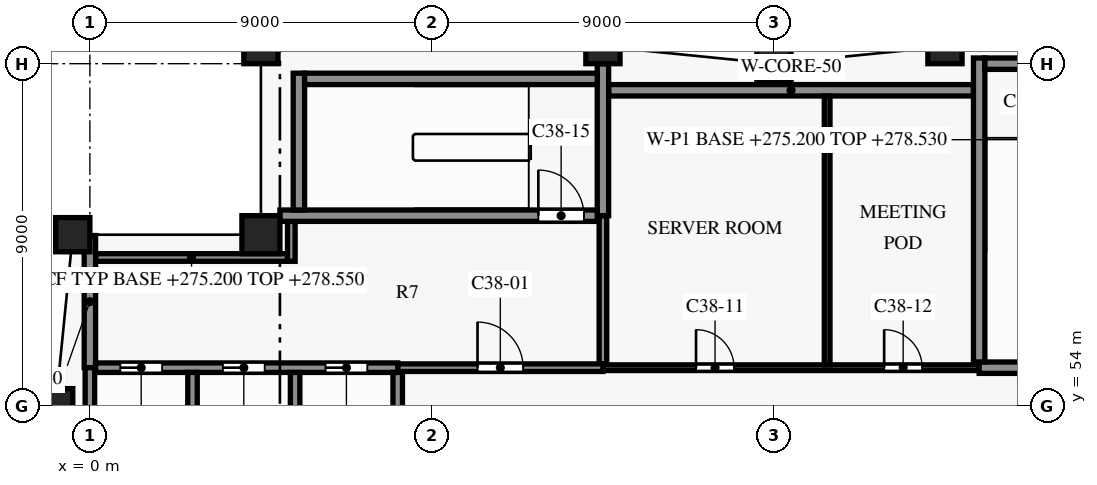
"""IFC4 building model, lengths in metres.
Left out: names, types, materials, properties, quantities, classifications, styles, units other than length and angle.
Written with IfcOpenShell. Run it as: python <this file> out.ifc"""

import sys

from ifc_helpers import new_model, si_unit, direction, frame, frame_2d, origin, origin_2d, place, context, subcontext, project, spatial, rectangle, extrude, element, fill, save


model = new_model("IFC4")
c1 = context("Model", 3, precision=1e-05, world=origin(), true_north=direction((0.0, 1.0)))
c2 = subcontext(c1, "Body", "Model", "MODEL_VIEW")
j1 = project(units=[si_unit("LENGTHUNIT", "METRE"), si_unit("PLANEANGLEUNIT", "RADIAN")], contexts=[c1])
p1 = place(None, origin())
s1 = spatial("IfcSite", under=j1, at=p1, CompositionType="ELEMENT")
p2 = place(p1, origin())
s2 = spatial("IfcBuilding", under=s1, at=p2, CompositionType="ELEMENT")
p3 = place(p2, frame((0.0, 0.0, 275.2)))
s3 = spatial("IfcBuildingStorey", under=s2, at=p3, CompositionType="ELEMENT", Elevation=275.2)
for number, where, z_axis, x_axis in (
    (1, (22.5, 63.45, 0.0), (0.0, 0.0, 1.0), (-0.995, -0.1, 0.0)),
    (2, (18.0, 63.0, 0.0), (0.0, 0.0, 1.0), (-1.0, 0.0, 0.0)),
    (3, (13.5, 63.45, 0.0), (0.0, 0.0, 1.0), (-0.995, 0.1, 0.0)),
    (4, (4.5, 63.45, 0.0), (0.0, 0.0, 1.0), (-0.995, -0.1, 0.0)),
    (5, (-0.45, 58.5, 0.0), (0.0, 0.0, 1.0), (-0.1, -0.995, 0.0)),
    (6, (-0.9, 54.0, 0.0), (0.0, 0.0, 1.0), (0.0, -1.0, 0.0)),
):
    element("IfcColumn", number, at=place(p3, frame(where, z_axis=z_axis, x_axis=x_axis)), inside=s3, PredefinedType="COLUMN", context=c2, shape_type="SweptSolid", body=[
        extrude(rectangle(XDim=0.9, YDim=0.9, at=origin_2d()), origin(), (0.0, 0.0, 1.0), 3.8),
    ])
p4 = place(p3, frame((4.5, 58.5, 0.0), z_axis=(0.0, 0.0, 1.0), x_axis=(1.0, 0.0, 0.0)))
e7 = element("IfcColumn", 7, at=p4, inside=s3, PredefinedType="COLUMN", context=c2, shape_type="SweptSolid", body=[
    extrude(rectangle(XDim=1.0, YDim=1.0, at=origin_2d()), origin(), (0.0, 0.0, 1.0), 3.8),
])
p5 = place(p3, frame((8.1, 55.0, 0.0), z_axis=(0.0, 0.0, 1.0), x_axis=(1.0, 0.0, 0.0)))
e8 = element("IfcWall", 8, at=p5, inside=s3, PredefinedType="PARTITIONING", context=c2, shape_type="SweptSolid", body=[
    extrude(rectangle(XDim=5.4, YDim=0.2, at=frame_2d((2.7, 0.0))), origin(), (0.0, 0.0, 1.0), 3.35),
])
p6 = place(p5, frame((2.1, 0.0, 0.0)))
e9 = element("IfcOpeningElement", 9, at=p6, cuts=e8, PredefinedType="OPENING", context=c2, shape_type="SweptSolid", body=[
    extrude(rectangle(XDim=1.2, YDim=2.2, at=frame_2d((0.6, 1.1))), frame((0.0, 0.11, 0.0), z_axis=(0.0, -1.0, 0.0), x_axis=(1.0, 0.0, 0.0)), (0.0, 0.0, 1.0), 0.22),
])
p7 = place(p3, frame((13.5, 55.0, 0.0), z_axis=(0.0, 0.0, 1.0), x_axis=(1.0, 0.0, 0.0)))
e10 = element("IfcWall", 10, at=p7, inside=s3, PredefinedType="PARTITIONING", context=c2, shape_type="SweptSolid", body=[
    extrude(rectangle(XDim=9.9, YDim=0.15, at=frame_2d((4.95, 0.0))), origin(), (0.0, 0.0, 1.0), 3.35),
])
p8 = place(p7, frame((2.45, 0.0, 0.0)))
e11 = element("IfcOpeningElement", 11, at=p8, cuts=e10, PredefinedType="OPENING", context=c2, shape_type="SweptSolid", body=[
    extrude(rectangle(XDim=1.0, YDim=2.1, at=frame_2d((0.5, 1.05))), frame((0.0, 0.085, 0.0), z_axis=(0.0, -1.0, 0.0), x_axis=(1.0, 0.0, 0.0)), (0.0, 0.0, 1.0), 0.17),
])
p9 = place(p7, frame((7.4, 0.0, 0.0)))
e12 = element("IfcOpeningElement", 12, at=p9, cuts=e10, PredefinedType="OPENING", context=c2, shape_type="SweptSolid", body=[
    extrude(rectangle(XDim=1.0, YDim=2.1, at=frame_2d((0.5, 1.05))), frame((0.0, 0.085, 0.0), z_axis=(0.0, -1.0, 0.0), x_axis=(1.0, 0.0, 0.0)), (0.0, 0.0, 1.0), 0.17),
])
p10 = place(p3, frame((0.15, 55.0, 0.0), z_axis=(0.0, 0.0, 1.0), x_axis=(1.0, 0.0, 0.0)))
e13 = element("IfcWall", 13, at=p10, inside=s3, PredefinedType="SHEAR", context=c2, shape_type="SweptSolid", body=[
    extrude(rectangle(XDim=7.95, YDim=0.25, at=frame_2d((3.975, 0.0))), origin(), (0.0, 0.0, 1.0), 3.5),
])
p11 = place(p10, frame((0.65, 0.0, 0.0)))
e14 = element("IfcOpeningElement", 14, at=p11, cuts=e13, PredefinedType="OPENING", context=c2, shape_type="SweptSolid", body=[
    extrude(rectangle(XDim=1.1, YDim=2.1, at=frame_2d((0.55, 1.05))), frame((0.0, 0.135, 0.0), z_axis=(0.0, -1.0, 0.0), x_axis=(1.0, 0.0, 0.0)), (0.0, 0.0, 1.0), 0.27),
])
p12 = place(p10, frame((3.35, 0.0, 0.0)))
e15 = element("IfcOpeningElement", 15, at=p12, cuts=e13, PredefinedType="OPENING", context=c2, shape_type="SweptSolid", body=[
    extrude(rectangle(XDim=1.1, YDim=2.1, at=frame_2d((0.55, 1.05))), frame((0.0, 0.135, 0.0), z_axis=(0.0, -1.0, 0.0), x_axis=(1.0, 0.0, 0.0)), (0.0, 0.0, 1.0), 0.27),
])
p13 = place(p10, frame((6.05, 0.0, 0.0)))
e16 = element("IfcOpeningElement", 16, at=p13, cuts=e13, PredefinedType="OPENING", context=c2, shape_type="SweptSolid", body=[
    extrude(rectangle(XDim=1.1, YDim=2.1, at=frame_2d((0.55, 1.05))), frame((0.0, 0.135, 0.0), z_axis=(0.0, -1.0, 0.0), x_axis=(1.0, 0.0, 0.0)), (0.0, 0.0, 1.0), 0.27),
])
p14 = place(p3, frame((23.4, 55.0, 0.0), z_axis=(0.0, 0.0, 1.0), x_axis=(1.0, 0.0, 0.0)))
e17 = element("IfcWall", 17, at=p14, inside=s3, PredefinedType="SHEAR", context=c2, shape_type="SweptSolid", body=[
    extrude(rectangle(XDim=3.45, YDim=0.3, at=frame_2d((1.725, 0.0))), origin(), (0.0, 0.0, 1.0), 3.5),
])
p15 = place(p3, frame((0.15, 57.9, 0.0), z_axis=(0.0, 0.0, 1.0), x_axis=(1.0, 0.0, 0.0)))
e18 = element("IfcWall", 18, at=p15, inside=s3, PredefinedType="PARTITIONING", context=c2, shape_type="SweptSolid", body=[
    extrude(rectangle(XDim=5.05, YDim=0.2, at=frame_2d((2.525, 0.0))), origin(), (0.0, 0.0, 1.0), 3.35),
])
p16 = place(p3, frame((5.0, 59.0, 0.0), z_axis=(0.0, 0.0, 1.0), x_axis=(1.0, 0.0, 0.0)))
e19 = element("IfcWall", 19, at=p16, inside=s3, PredefinedType="SHEAR", context=c2, shape_type="SweptSolid", body=[
    extrude(rectangle(XDim=8.35, YDim=0.3, at=frame_2d((4.175, 0.0))), origin(), (0.0, 0.0, 1.0), 3.5),
])
p17 = place(p16, frame((6.8, 0.0, 0.0)))
e20 = element("IfcOpeningElement", 20, at=p17, cuts=e19, PredefinedType="OPENING", context=c2, shape_type="SweptSolid", body=[
    extrude(rectangle(XDim=1.2, YDim=2.2, at=frame_2d((0.6, 1.1))), frame((0.0, 0.16, 0.0), z_axis=(0.0, -1.0, 0.0), x_axis=(1.0, 0.0, 0.0)), (0.0, 0.0, 1.0), 0.32),
])
p18 = place(p3, frame((13.65, 62.3, 0.0), z_axis=(0.0, 0.0, 1.0), x_axis=(1.0, 0.0, 0.0)))
e21 = element("IfcWall", 21, at=p18, inside=s3, PredefinedType="SHEAR", context=c2, shape_type="SweptSolid", body=[
    extrude(rectangle(XDim=9.6, YDim=0.3, at=frame_2d((4.8, 0.0))), origin(), (0.0, 0.0, 1.0), 3.5),
])
p19 = place(p3, frame((5.65, 62.6, 0.0), z_axis=(0.0, 0.0, 1.0), x_axis=(1.0, 0.0, 0.0)))
e22 = element("IfcWall", 22, at=p19, inside=s3, PredefinedType="SHEAR", context=c2, shape_type="SweptSolid", body=[
    extrude(rectangle(XDim=7.7, YDim=0.3, at=frame_2d((3.85, 0.0))), origin(), (0.0, 0.0, 1.0), 3.5),
])
p20 = place(p3, frame((23.55, 63.0, 0.0), z_axis=(0.0, 0.0, 1.0), x_axis=(1.0, 0.0, 0.0)))
e23 = element("IfcWall", 23, at=p20, inside=s3, PredefinedType="SHEAR", context=c2, shape_type="SweptSolid", body=[
    extrude(rectangle(XDim=3.3, YDim=0.3, at=frame_2d((1.65, 0.0))), origin(), (0.0, 0.0, 1.0), 3.5),
])
p21 = place(p3, frame((0.0, 55.0, 0.0), z_axis=(0.0, 0.0, 1.0), x_axis=(0.0, 1.0, 0.0)))
e24 = element("IfcWall", 24, at=p21, inside=s3, PredefinedType="SHEAR", context=c2, shape_type="SweptSolid", body=[
    extrude(rectangle(XDim=3.478, YDim=0.3, at=frame_2d((1.739, 0.0))), origin(), (0.0, 0.0, 1.0), 3.5),
])
p22 = place(p3, frame((0.0, 51.65, 0.0), z_axis=(0.0, 0.0, 1.0), x_axis=(0.0, 1.0, 0.0)))
e25 = element("IfcWall", 25, at=p22, inside=s3, PredefinedType="SHEAR", context=c2, shape_type="SweptSolid", body=[
    extrude(rectangle(XDim=3.35, YDim=0.25, at=frame_2d((1.675, 0.0))), origin(), (0.0, 0.0, 1.0), 3.5),
])
p23 = place(p3, frame((2.7, 51.925, 0.0), z_axis=(0.0, 0.0, 1.0), x_axis=(0.0, 1.0, 0.0)))
e26 = element("IfcWall", 26, at=p23, inside=s3, PredefinedType="SHEAR", context=c2, shape_type="SweptSolid", body=[
    extrude(rectangle(XDim=2.95, YDim=0.25, at=frame_2d((1.475, 0.0))), origin(), (0.0, 0.0, 1.0), 3.5),
])
p24 = place(p3, frame((5.3, 57.8, 0.0), z_axis=(0.0, 0.0, 1.0), x_axis=(0.0, 1.0, 0.0)))
e27 = element("IfcWall", 27, at=p24, inside=s3, PredefinedType="PARTITIONING", context=c2, shape_type="SweptSolid", body=[
    extrude(rectangle(XDim=1.05, YDim=0.2, at=frame_2d((0.525, 0.0))), origin(), (0.0, 0.0, 1.0), 3.35),
])
p25 = place(p3, frame((5.4, 51.925, 0.0), z_axis=(0.0, 0.0, 1.0), x_axis=(0.0, 1.0, 0.0)))
e28 = element("IfcWall", 28, at=p25, inside=s3, PredefinedType="SHEAR", context=c2, shape_type="SweptSolid", body=[
    extrude(rectangle(XDim=2.95, YDim=0.25, at=frame_2d((1.475, 0.0))), origin(), (0.0, 0.0, 1.0), 3.5),
])
p26 = place(p3, frame((5.5, 59.15, 0.0), z_axis=(0.0, 0.0, 1.0), x_axis=(0.0, 1.0, 0.0)))
e29 = element("IfcWall", 29, at=p26, inside=s3, PredefinedType="SHEAR", context=c2, shape_type="SweptSolid", body=[
    extrude(rectangle(XDim=3.6, YDim=0.3, at=frame_2d((1.8, 0.0))), origin(), (0.0, 0.0, 1.0), 3.5),
])
p27 = place(p3, frame((8.1, 51.925, 0.0), z_axis=(0.0, 0.0, 1.0), x_axis=(0.0, 1.0, 0.0)))
e30 = element("IfcWall", 30, at=p27, inside=s3, PredefinedType="SHEAR", context=c2, shape_type="SweptSolid", body=[
    extrude(rectangle(XDim=2.95, YDim=0.25, at=frame_2d((1.475, 0.0))), origin(), (0.0, 0.0, 1.0), 3.5),
])
p28 = place(p3, frame((13.5, 55.1, 0.0), z_axis=(0.0, 0.0, 1.0), x_axis=(0.0, 1.0, 0.0)))
e31 = element("IfcWall", 31, at=p28, inside=s3, PredefinedType="PARTITIONING", context=c2, shape_type="SweptSolid", body=[
    extrude(rectangle(XDim=3.9, YDim=0.2, at=frame_2d((1.95, 0.0))), origin(), (0.0, 0.0, 1.0), 3.35),
])
p29 = place(p3, frame((13.5, 59.0, 0.0), z_axis=(0.0, 0.0, 1.0), x_axis=(0.0, 1.0, 0.0)))
e32 = element("IfcWall", 32, at=p29, inside=s3, PredefinedType="SHEAR", context=c2, shape_type="SweptSolid", body=[
    extrude(rectangle(XDim=3.998, YDim=0.3, at=frame_2d((1.999, 0.0))), origin(), (0.0, 0.0, 1.0), 3.5),
])
p30 = place(p3, frame((19.4, 55.075, 0.0), z_axis=(0.0, 0.0, 1.0), x_axis=(0.0, 1.0, 0.0)))
e33 = element("IfcWall", 33, at=p30, inside=s3, PredefinedType="PARTITIONING", context=c2, shape_type="SweptSolid", body=[
    extrude(rectangle(XDim=7.075, YDim=0.15, at=frame_2d((3.538, 0.0))), origin(), (0.0, 0.0, 1.0), 3.35),
])
p31 = place(p3, frame((23.4, 55.15, 0.0), z_axis=(0.0, 0.0, 1.0), x_axis=(0.0, 1.0, 0.0)))
e34 = element("IfcWall", 34, at=p31, inside=s3, PredefinedType="SHEAR", context=c2, shape_type="SweptSolid", body=[
    extrude(rectangle(XDim=8.0, YDim=0.3, at=frame_2d((4.0, 0.0))), origin(), (0.0, 0.0, 1.0), 3.5),
])
p32 = place(p6, origin())
e35 = element("IfcDoor", 35, at=p32, inside=s3, OperationType="SINGLE_SWING_RIGHT", PredefinedType="DOOR", context=c2, shape_type="SweptSolid", body=[
    extrude(rectangle(XDim=1.2, YDim=2.2, at=frame_2d((0.6, 1.1))), frame((0.0, 0.025, 0.0), z_axis=(0.0, -1.0, 0.0), x_axis=(1.0, 0.0, 0.0)), (0.0, 0.0, 1.0), 0.05),
])
fill(e9, e35)
p33 = place(p8, origin())
e36 = element("IfcDoor", 36, at=p33, inside=s3, OperationType="SINGLE_SWING_LEFT", PredefinedType="DOOR", context=c2, shape_type="SweptSolid", body=[
    extrude(rectangle(XDim=1.0, YDim=2.1, at=frame_2d((0.5, 1.05))), frame((0.0, 0.025, 0.0), z_axis=(0.0, -1.0, 0.0), x_axis=(1.0, 0.0, 0.0)), (0.0, 0.0, 1.0), 0.05),
])
fill(e11, e36)
p34 = place(p9, origin())
e37 = element("IfcDoor", 37, at=p34, inside=s3, OperationType="SINGLE_SWING_RIGHT", PredefinedType="DOOR", context=c2, shape_type="SweptSolid", body=[
    extrude(rectangle(XDim=1.0, YDim=2.1, at=frame_2d((0.5, 1.05))), frame((0.0, 0.025, 0.0), z_axis=(0.0, -1.0, 0.0), x_axis=(1.0, 0.0, 0.0)), (0.0, 0.0, 1.0), 0.05),
])
fill(e12, e37)
p35 = place(p17, origin())
e38 = element("IfcDoor", 38, at=p35, inside=s3, OperationType="SINGLE_SWING_RIGHT", PredefinedType="DOOR", context=c2, shape_type="SweptSolid", body=[
    extrude(rectangle(XDim=1.2, YDim=2.2, at=frame_2d((0.6, 1.1))), frame((0.0, 0.025, 0.0), z_axis=(0.0, -1.0, 0.0), x_axis=(1.0, 0.0, 0.0)), (0.0, 0.0, 1.0), 0.05),
])
fill(e20, e38)
p36 = place(p11, origin())
e39 = element("IfcDoor", 39, at=p36, inside=s3, OperationType="DOUBLE_DOOR_SLIDING", PredefinedType="DOOR", context=c2, shape_type="SweptSolid", body=[
    extrude(rectangle(XDim=1.1, YDim=2.1, at=frame_2d((0.55, 1.05))), frame((0.0, 0.025, 0.0), z_axis=(0.0, -1.0, 0.0), x_axis=(1.0, 0.0, 0.0)), (0.0, 0.0, 1.0), 0.05),
])
fill(e14, e39)
p37 = place(p12, origin())
e40 = element("IfcDoor", 40, at=p37, inside=s3, OperationType="DOUBLE_DOOR_SLIDING", PredefinedType="DOOR", context=c2, shape_type="SweptSolid", body=[
    extrude(rectangle(XDim=1.1, YDim=2.1, at=frame_2d((0.55, 1.05))), frame((0.0, 0.025, 0.0), z_axis=(0.0, -1.0, 0.0), x_axis=(1.0, 0.0, 0.0)), (0.0, 0.0, 1.0), 0.05),
])
fill(e15, e40)
p38 = place(p13, origin())
e41 = element("IfcDoor", 41, at=p38, inside=s3, OperationType="DOUBLE_DOOR_SLIDING", PredefinedType="DOOR", context=c2, shape_type="SweptSolid", body=[
    extrude(rectangle(XDim=1.1, YDim=2.1, at=frame_2d((0.55, 1.05))), frame((0.0, 0.025, 0.0), z_axis=(0.0, -1.0, 0.0), x_axis=(1.0, 0.0, 0.0)), (0.0, 0.0, 1.0), 0.05),
])
fill(e16, e41)
save(model, sys.argv[1])
